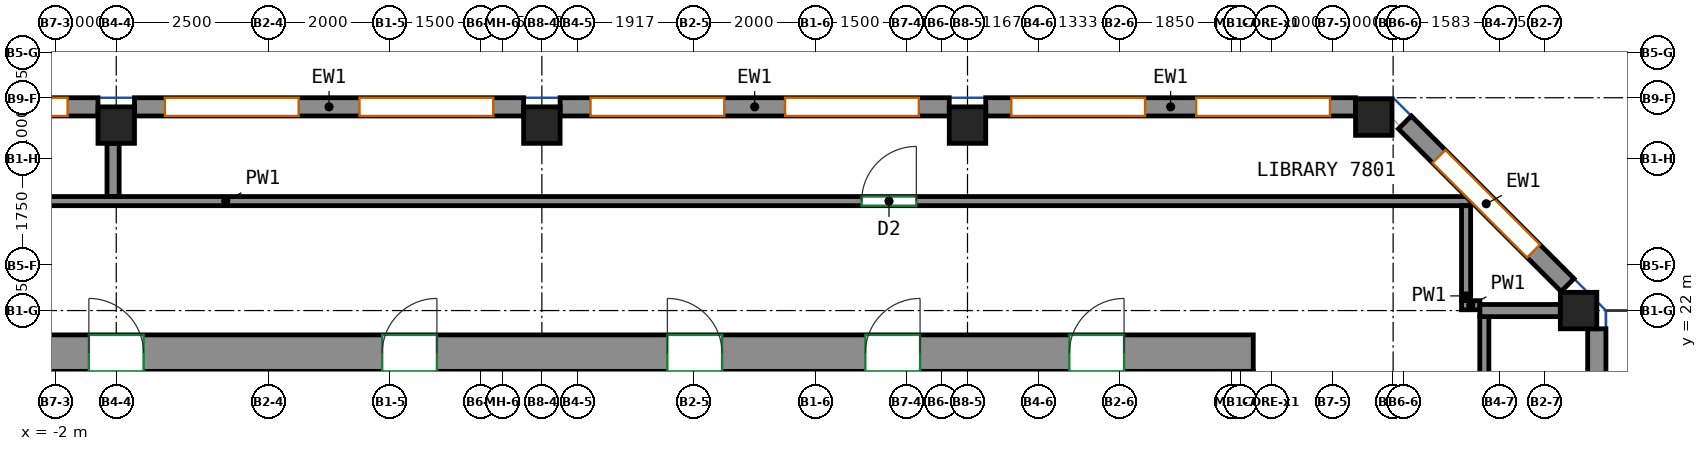
"""IFC4 building model, lengths in metres.
Left out: names, types, materials, properties, quantities, classifications, styles, units other than length and angle.
Written with IfcOpenShell. Run it as: python <this file> out.ifc"""

import sys

from ifc_helpers import new_model, si_unit, direction, frame, frame_2d, origin, origin_2d, place, context, subcontext, project, spatial, rectangle, extrude, source, transform, mapped, element, fill, save


model = new_model("IFC4")
c1 = context("Model", 3, precision=1e-05, world=origin(), true_north=direction((0.0, 1.0)))
c2 = subcontext(c1, "Body", "Model", "MODEL_VIEW")
j1 = project(units=[si_unit("LENGTHUNIT", "METRE"), si_unit("PLANEANGLEUNIT", "RADIAN")], contexts=[c1])
p1 = place(None, origin())
s1 = spatial("IfcSite", under=j1, at=p1, CompositionType="ELEMENT")
p2 = place(p1, origin())
s2 = spatial("IfcBuilding", under=s1, at=p2, CompositionType="ELEMENT")
p3 = place(p2, frame((0.0, 0.0, 312.0)))
s3 = spatial("IfcBuildingStorey", under=s2, at=p3, CompositionType="ELEMENT", Elevation=312.0)
m1 = source(origin(), c2, "Body", "SweptSolid", [
    extrude(rectangle(XDim=0.6, YDim=0.6, at=origin_2d()), origin(), (0.0, 0.0, 1.0), 3.12),
])
for number, where, z_axis, x_axis in (
    (1, (-1.0, 25.05, 0.0), (0.0, 0.0, 1.0), (1.0, 0.0, 0.0)),
    (2, (6.0, 25.05, 0.0), (0.0, 0.0, 1.0), (1.0, 0.0, 0.0)),
    (3, (13.0, 25.05, 0.0), (0.0, 0.0, 1.0), (1.0, 0.0, 0.0)),
    (4, (19.682, 25.182, 0.0), (0.0, 0.0, 1.0), (1.0, 0.0, 0.0)),
    (5, (23.05, 22.0, 0.0), (0.0, 0.0, 1.0), (1.0, 0.0, 0.0)),
):
    element("IfcColumn", number, at=place(p3, frame(where, z_axis=z_axis, x_axis=x_axis)), inside=s3, PredefinedType="COLUMN", context=c2, shape_type="MappedRepresentation", body=[
        mapped(m1, transform((0.0, 0.0, 0.0))),
    ])
m2 = source(origin(), c2, "Body", "SweptSolid", [
    extrude(rectangle(XDim=33.3, YDim=0.6, at=frame_2d((16.65, 0.0))), origin(), (0.0, 0.0, 1.0), 3.12),
])
p4 = place(p3, frame((-15.6, 21.3, 0.0), z_axis=(0.0, 0.0, 1.0), x_axis=(1.0, 0.0, 0.0)))
e6 = element("IfcWall", 6, at=p4, inside=s3, PredefinedType="SHEAR", context=c2, shape_type="MappedRepresentation", body=[
    mapped(m2, transform((0.0, 0.0, 0.0))),
])
p5 = place(p4, frame((8.12, 0.0, 0.0)))
e7 = element("IfcOpeningElement", 7, at=p5, cuts=e6, PredefinedType="OPENING", context=c2, shape_type="SweptSolid", body=[
    extrude(rectangle(XDim=0.9, YDim=2.1, at=frame_2d((0.45, 1.05))), frame((0.0, 0.31, 0.0), z_axis=(0.0, -1.0, 0.0), x_axis=(1.0, 0.0, 0.0)), (0.0, 0.0, 1.0), 0.62),
])
p6 = place(p4, frame((14.15, 0.0, 0.0)))
e8 = element("IfcOpeningElement", 8, at=p6, cuts=e6, PredefinedType="OPENING", context=c2, shape_type="SweptSolid", body=[
    extrude(rectangle(XDim=0.9, YDim=2.1, at=frame_2d((0.45, 1.05))), frame((0.0, 0.31, 0.0), z_axis=(0.0, -1.0, 0.0), x_axis=(1.0, 0.0, 0.0)), (0.0, 0.0, 1.0), 0.62),
])
p7 = place(p4, frame((18.974, 0.0, 0.0)))
e9 = element("IfcOpeningElement", 9, at=p7, cuts=e6, PredefinedType="OPENING", context=c2, shape_type="SweptSolid", body=[
    extrude(rectangle(XDim=0.9, YDim=2.1, at=frame_2d((0.45, 1.05))), frame((0.0, 0.31, 0.0), z_axis=(0.0, -1.0, 0.0), x_axis=(1.0, 0.0, 0.0)), (0.0, 0.0, 1.0), 0.62),
])
p8 = place(p4, frame((23.664, 0.0, 0.0)))
e10 = element("IfcOpeningElement", 10, at=p8, cuts=e6, PredefinedType="OPENING", context=c2, shape_type="SweptSolid", body=[
    extrude(rectangle(XDim=0.9, YDim=2.1, at=frame_2d((0.45, 1.05))), frame((0.0, 0.31, 0.0), z_axis=(0.0, -1.0, 0.0), x_axis=(1.0, 0.0, 0.0)), (0.0, 0.0, 1.0), 0.62),
])
p9 = place(p4, frame((26.92, 0.0, 0.0)))
e11 = element("IfcOpeningElement", 11, at=p9, cuts=e6, PredefinedType="OPENING", context=c2, shape_type="SweptSolid", body=[
    extrude(rectangle(XDim=0.9, YDim=2.1, at=frame_2d((0.45, 1.05))), frame((0.0, 0.31, 0.0), z_axis=(0.0, -1.0, 0.0), x_axis=(1.0, 0.0, 0.0)), (0.0, 0.0, 1.0), 0.62),
])
p10 = place(p4, frame((2.125, 0.0, 0.0)))
e12 = element("IfcOpeningElement", 12, at=p10, cuts=e6, PredefinedType="OPENING", context=c2, shape_type="SweptSolid", body=[
    extrude(rectangle(XDim=0.9, YDim=2.1, at=frame_2d((0.45, 1.05))), frame((0.0, 0.31, 0.0), z_axis=(0.0, -1.0, 0.0), x_axis=(1.0, 0.0, 0.0)), (0.0, 0.0, 1.0), 0.62),
])
p11 = place(p4, frame((30.275, 0.0, 0.0)))
e13 = element("IfcOpeningElement", 13, at=p11, cuts=e6, PredefinedType="OPENING", context=c2, shape_type="SweptSolid", body=[
    extrude(rectangle(XDim=0.9, YDim=2.1, at=frame_2d((0.45, 1.05))), frame((0.0, 0.31, 0.0), z_axis=(0.0, -1.0, 0.0), x_axis=(1.0, 0.0, 0.0)), (0.0, 0.0, 1.0), 0.62),
])
m3 = source(origin(), c2, "Body", "SweptSolid", [
    extrude(rectangle(XDim=13.4, YDim=0.3, at=frame_2d((6.7, 0.0))), origin(), (0.0, 0.0, 1.0), 3.12),
])
p12 = place(p3, frame((23.35, 8.3, 0.0), z_axis=(0.0, 0.0, 1.0), x_axis=(0.0, 1.0, 0.0)))
e14 = element("IfcWall", 14, at=p12, inside=s3, PredefinedType="SOLIDWALL", context=c2, shape_type="MappedRepresentation", body=[
    mapped(m3, transform((0.0, 0.0, 0.0))),
])
p13 = place(p12, frame((0.85, 0.0, 0.8)))
e15 = element("IfcOpeningElement", 15, at=p13, cuts=e14, PredefinedType="OPENING", context=c2, shape_type="SweptSolid", body=[
    extrude(rectangle(XDim=1.5, YDim=2.05, at=frame_2d((0.75, 1.025))), frame((0.0, 0.16, 0.0), z_axis=(0.0, -1.0, 0.0), x_axis=(1.0, 0.0, 0.0)), (0.0, 0.0, 1.0), 0.32),
])
p14 = place(p12, frame((4.95, 0.0, 0.8)))
e16 = element("IfcOpeningElement", 16, at=p14, cuts=e14, PredefinedType="OPENING", context=c2, shape_type="SweptSolid", body=[
    extrude(rectangle(XDim=1.5, YDim=2.05, at=frame_2d((0.75, 1.025))), frame((0.0, 0.16, 0.0), z_axis=(0.0, -1.0, 0.0), x_axis=(1.0, 0.0, 0.0)), (0.0, 0.0, 1.0), 0.32),
])
p15 = place(p12, frame((8.45, 0.0, 0.8)))
e17 = element("IfcOpeningElement", 17, at=p15, cuts=e14, PredefinedType="OPENING", context=c2, shape_type="SweptSolid", body=[
    extrude(rectangle(XDim=1.5, YDim=2.05, at=frame_2d((0.75, 1.025))), frame((0.0, 0.16, 0.0), z_axis=(0.0, -1.0, 0.0), x_axis=(1.0, 0.0, 0.0)), (0.0, 0.0, 1.0), 0.32),
])
p16 = place(p12, frame((11.05, 0.0, 0.8)))
e18 = element("IfcOpeningElement", 18, at=p16, cuts=e14, PredefinedType="OPENING", context=c2, shape_type="SweptSolid", body=[
    extrude(rectangle(XDim=1.5, YDim=2.05, at=frame_2d((0.75, 1.025))), frame((0.0, 0.16, 0.0), z_axis=(0.0, -1.0, 0.0), x_axis=(1.0, 0.0, 0.0)), (0.0, 0.0, 1.0), 0.32),
])
m4 = source(origin(), c2, "Body", "SweptSolid", [
    extrude(rectangle(XDim=3.783, YDim=0.3, at=frame_2d((1.892, 0.0))), origin(), (0.0, 0.0, 1.0), 3.12),
])
p17 = place(p3, frame((22.869, 22.419, 0.0), z_axis=(0.0, 0.0, 1.0), x_axis=(-0.707106781187, 0.707106781187, 0.0)))
e19 = element("IfcWall", 19, at=p17, inside=s3, PredefinedType="SOLIDWALL", context=c2, shape_type="MappedRepresentation", body=[
    mapped(m4, transform((0.0, 0.0, 0.0))),
])
p18 = place(p17, frame((0.792, 0.0, 0.8)))
e20 = element("IfcOpeningElement", 20, at=p18, cuts=e19, PredefinedType="OPENING", context=c2, shape_type="SweptSolid", body=[
    extrude(rectangle(XDim=2.2, YDim=2.05, at=frame_2d((1.1, 1.025))), frame((0.0, 0.16, 0.0), z_axis=(0.0, -1.0, 0.0), x_axis=(1.0, 0.0, 0.0)), (0.0, 0.0, 1.0), 0.32),
])
m5 = source(origin(), c2, "Body", "SweptSolid", [
    extrude(rectangle(XDim=6.082, YDim=0.3, at=frame_2d((3.041, 0.0))), origin(), (0.0, 0.0, 1.0), 3.12),
])
p19 = place(p3, frame((19.382, 25.35, 0.0), z_axis=(0.0, 0.0, 1.0), x_axis=(-1.0, 0.0, 0.0)))
e21 = element("IfcWall", 21, at=p19, inside=s3, PredefinedType="SOLIDWALL", context=c2, shape_type="MappedRepresentation", body=[
    mapped(m5, transform((0.0, 0.0, 0.0))),
])
p20 = place(p19, frame((0.42, 0.0, 0.8)))
e22 = element("IfcOpeningElement", 22, at=p20, cuts=e21, PredefinedType="OPENING", context=c2, shape_type="SweptSolid", body=[
    extrude(rectangle(XDim=2.2, YDim=2.05, at=frame_2d((1.1, 1.025))), frame((0.0, 0.16, 0.0), z_axis=(0.0, -1.0, 0.0), x_axis=(1.0, 0.0, 0.0)), (0.0, 0.0, 1.0), 0.32),
])
p21 = place(p19, frame((3.461, 0.0, 0.8)))
e23 = element("IfcOpeningElement", 23, at=p21, cuts=e21, PredefinedType="OPENING", context=c2, shape_type="SweptSolid", body=[
    extrude(rectangle(XDim=2.2, YDim=2.05, at=frame_2d((1.1, 1.025))), frame((0.0, 0.16, 0.0), z_axis=(0.0, -1.0, 0.0), x_axis=(1.0, 0.0, 0.0)), (0.0, 0.0, 1.0), 0.32),
])
m6 = source(origin(), c2, "Body", "SweptSolid", [
    extrude(rectangle(XDim=6.4, YDim=0.3, at=frame_2d((3.2, 0.0))), origin(), (0.0, 0.0, 1.0), 3.12),
])
p22 = place(p3, frame((12.7, 25.35, 0.0), z_axis=(0.0, 0.0, 1.0), x_axis=(-1.0, 0.0, 0.0)))
e24 = element("IfcWall", 24, at=p22, inside=s3, PredefinedType="SOLIDWALL", context=c2, shape_type="MappedRepresentation", body=[
    mapped(m6, transform((0.0, 0.0, 0.0))),
])
p23 = place(p22, frame((0.5, 0.0, 0.8)))
e25 = element("IfcOpeningElement", 25, at=p23, cuts=e24, PredefinedType="OPENING", context=c2, shape_type="SweptSolid", body=[
    extrude(rectangle(XDim=2.2, YDim=2.05, at=frame_2d((1.1, 1.025))), frame((0.0, 0.16, 0.0), z_axis=(0.0, -1.0, 0.0), x_axis=(1.0, 0.0, 0.0)), (0.0, 0.0, 1.0), 0.32),
])
p24 = place(p22, frame((3.7, 0.0, 0.8)))
e26 = element("IfcOpeningElement", 26, at=p24, cuts=e24, PredefinedType="OPENING", context=c2, shape_type="SweptSolid", body=[
    extrude(rectangle(XDim=2.2, YDim=2.05, at=frame_2d((1.1, 1.025))), frame((0.0, 0.16, 0.0), z_axis=(0.0, -1.0, 0.0), x_axis=(1.0, 0.0, 0.0)), (0.0, 0.0, 1.0), 0.32),
])
p25 = place(p3, frame((5.7, 25.35, 0.0), z_axis=(0.0, 0.0, 1.0), x_axis=(-1.0, 0.0, 0.0)))
e27 = element("IfcWall", 27, at=p25, inside=s3, PredefinedType="SOLIDWALL", context=c2, shape_type="MappedRepresentation", body=[
    mapped(m6, transform((0.0, 0.0, 0.0))),
])
p26 = place(p25, frame((0.5, 0.0, 0.8)))
e28 = element("IfcOpeningElement", 28, at=p26, cuts=e27, PredefinedType="OPENING", context=c2, shape_type="SweptSolid", body=[
    extrude(rectangle(XDim=2.2, YDim=2.05, at=frame_2d((1.1, 1.025))), frame((0.0, 0.16, 0.0), z_axis=(0.0, -1.0, 0.0), x_axis=(1.0, 0.0, 0.0)), (0.0, 0.0, 1.0), 0.32),
])
p27 = place(p25, frame((3.7, 0.0, 0.8)))
e29 = element("IfcOpeningElement", 29, at=p27, cuts=e27, PredefinedType="OPENING", context=c2, shape_type="SweptSolid", body=[
    extrude(rectangle(XDim=2.2, YDim=2.05, at=frame_2d((1.1, 1.025))), frame((0.0, 0.16, 0.0), z_axis=(0.0, -1.0, 0.0), x_axis=(1.0, 0.0, 0.0)), (0.0, 0.0, 1.0), 0.32),
])
p28 = place(p3, frame((-1.3, 25.35, 0.0), z_axis=(0.0, 0.0, 1.0), x_axis=(-1.0, 0.0, 0.0)))
e30 = element("IfcWall", 30, at=p28, inside=s3, PredefinedType="SOLIDWALL", context=c2, shape_type="MappedRepresentation", body=[
    mapped(m6, transform((0.0, 0.0, 0.0))),
])
p29 = place(p28, frame((0.5, 0.0, 0.8)))
e31 = element("IfcOpeningElement", 31, at=p29, cuts=e30, PredefinedType="OPENING", context=c2, shape_type="SweptSolid", body=[
    extrude(rectangle(XDim=2.2, YDim=2.05, at=frame_2d((1.1, 1.025))), frame((0.0, 0.16, 0.0), z_axis=(0.0, -1.0, 0.0), x_axis=(1.0, 0.0, 0.0)), (0.0, 0.0, 1.0), 0.32),
])
p30 = place(p28, frame((3.7, 0.0, 0.8)))
e32 = element("IfcOpeningElement", 32, at=p30, cuts=e30, PredefinedType="OPENING", context=c2, shape_type="SweptSolid", body=[
    extrude(rectangle(XDim=2.2, YDim=2.05, at=frame_2d((1.1, 1.025))), frame((0.0, 0.16, 0.0), z_axis=(0.0, -1.0, 0.0), x_axis=(1.0, 0.0, 0.0)), (0.0, 0.0, 1.0), 0.32),
])
p31 = place(p3, frame((21.5, -7.75, 0.0), z_axis=(0.0, 0.0, 1.0), x_axis=(0.0, 1.0, 0.0)))
e33 = element("IfcWall", 33, at=p31, inside=s3, PredefinedType="PARTITIONING", context=c2, shape_type="SweptSolid", body=[
    extrude(rectangle(XDim=29.66, YDim=0.15, at=frame_2d((14.83, 0.0))), origin(), (0.0, 0.0, 1.0), 3.12),
])
p32 = place(p31, frame((20.142, 0.0, 0.0)))
e34 = element("IfcOpeningElement", 34, at=p32, cuts=e33, PredefinedType="OPENING", context=c2, shape_type="SweptSolid", body=[
    extrude(rectangle(XDim=0.9, YDim=2.1, at=frame_2d((0.45, 1.05))), frame((0.0, 0.085, 0.0), z_axis=(0.0, -1.0, 0.0), x_axis=(1.0, 0.0, 0.0)), (0.0, 0.0, 1.0), 0.17),
])
p33 = place(p3, frame((-19.675, 23.8, 0.0), z_axis=(0.0, 0.0, 1.0), x_axis=(1.0, 0.0, 0.0)))
e35 = element("IfcWall", 35, at=p33, inside=s3, PredefinedType="PARTITIONING", context=c2, shape_type="SweptSolid", body=[
    extrude(rectangle(XDim=40.95, YDim=0.15, at=frame_2d((20.475, 0.0))), origin(), (0.0, 0.0, 1.0), 3.12),
])
p34 = place(p33, frame((8.716, 0.0, 0.0)))
e36 = element("IfcOpeningElement", 36, at=p34, cuts=e35, PredefinedType="OPENING", context=c2, shape_type="SweptSolid", body=[
    extrude(rectangle(XDim=0.9, YDim=2.1, at=frame_2d((0.45, 1.05))), frame((0.0, 0.085, 0.0), z_axis=(0.0, -1.0, 0.0), x_axis=(1.0, 0.0, 0.0)), (0.0, 0.0, 1.0), 0.17),
])
p35 = place(p33, frame((30.934, 0.0, 0.0)))
e37 = element("IfcOpeningElement", 37, at=p35, cuts=e35, PredefinedType="OPENING", context=c2, shape_type="SweptSolid", body=[
    extrude(rectangle(XDim=0.9, YDim=2.1, at=frame_2d((0.45, 1.05))), frame((0.0, 0.085, 0.0), z_axis=(0.0, -1.0, 0.0), x_axis=(1.0, 0.0, 0.0)), (0.0, 0.0, 1.0), 0.17),
])
p36 = place(p3, frame((21.2, 22.163, 0.0), z_axis=(0.0, 0.0, 1.0), x_axis=(0.0, 1.0, 0.0)))
e38 = element("IfcWall", 38, at=p36, inside=s3, PredefinedType="PARTITIONING", context=c2, shape_type="SweptSolid", body=[
    extrude(rectangle(XDim=1.562, YDim=0.15, at=frame_2d((0.781, 0.0))), origin(), (0.0, 0.0, 1.0), 3.12),
])
p37 = place(p3, frame((21.427, 22.088, 0.0), z_axis=(0.0, 0.0, 1.0), x_axis=(-1.0, 0.0, 0.0)))
e39 = element("IfcWall", 39, at=p37, inside=s3, PredefinedType="PARTITIONING", context=c2, shape_type="SweptSolid", body=[
    extrude(rectangle(XDim=0.302, YDim=0.15, at=frame_2d((0.151, 0.0))), origin(), (0.0, 0.0, 1.0), 3.12),
])
p38 = place(p3, frame((22.75, 22.0, 0.0), z_axis=(0.0, 0.0, 1.0), x_axis=(-1.0, 0.0, 0.0)))
e40 = element("IfcWall", 40, at=p38, inside=s3, PredefinedType="PARTITIONING", context=c2, shape_type="SweptSolid", body=[
    extrude(rectangle(XDim=1.323, YDim=0.2, at=frame_2d((0.662, 0.0))), origin(), (0.0, 0.0, 1.0), 3.12),
])
p39 = place(p3, frame((-1.052, 23.877, 0.0), z_axis=(0.0, 0.0, 1.0), x_axis=(0.0, 1.0, 0.0)))
e41 = element("IfcWall", 41, at=p39, inside=s3, PredefinedType="PARTITIONING", context=c2, shape_type="SweptSolid", body=[
    extrude(rectangle(XDim=0.873, YDim=0.2, at=frame_2d((0.437, 0.0))), origin(), (0.0, 0.0, 1.0), 3.12),
])
p40 = place(p18, origin())
e42 = element("IfcWindow", 42, at=p40, inside=s3, PartitioningType="SINGLE_PANEL", PredefinedType="WINDOW", context=c2, shape_type="SweptSolid", body=[
    extrude(rectangle(XDim=2.2, YDim=2.05, at=frame_2d((1.1, 1.025))), frame((0.0, 0.03, 0.0), z_axis=(0.0, -1.0, 0.0), x_axis=(1.0, 0.0, 0.0)), (0.0, 0.0, 1.0), 0.06),
])
fill(e20, e42)
p41 = place(p20, origin())
e43 = element("IfcWindow", 43, at=p41, inside=s3, PartitioningType="SINGLE_PANEL", PredefinedType="WINDOW", context=c2, shape_type="SweptSolid", body=[
    extrude(rectangle(XDim=2.2, YDim=2.05, at=frame_2d((1.1, 1.025))), frame((0.0, 0.03, 0.0), z_axis=(0.0, -1.0, 0.0), x_axis=(1.0, 0.0, 0.0)), (0.0, 0.0, 1.0), 0.06),
])
fill(e22, e43)
p42 = place(p21, origin())
e44 = element("IfcWindow", 44, at=p42, inside=s3, PartitioningType="SINGLE_PANEL", PredefinedType="WINDOW", context=c2, shape_type="SweptSolid", body=[
    extrude(rectangle(XDim=2.2, YDim=2.05, at=frame_2d((1.1, 1.025))), frame((0.0, 0.03, 0.0), z_axis=(0.0, -1.0, 0.0), x_axis=(1.0, 0.0, 0.0)), (0.0, 0.0, 1.0), 0.06),
])
fill(e23, e44)
p43 = place(p23, origin())
e45 = element("IfcWindow", 45, at=p43, inside=s3, PartitioningType="SINGLE_PANEL", PredefinedType="WINDOW", context=c2, shape_type="SweptSolid", body=[
    extrude(rectangle(XDim=2.2, YDim=2.05, at=frame_2d((1.1, 1.025))), frame((0.0, 0.03, 0.0), z_axis=(0.0, -1.0, 0.0), x_axis=(1.0, 0.0, 0.0)), (0.0, 0.0, 1.0), 0.06),
])
fill(e25, e45)
p44 = place(p24, origin())
e46 = element("IfcWindow", 46, at=p44, inside=s3, PartitioningType="SINGLE_PANEL", PredefinedType="WINDOW", context=c2, shape_type="SweptSolid", body=[
    extrude(rectangle(XDim=2.2, YDim=2.05, at=frame_2d((1.1, 1.025))), frame((0.0, 0.03, 0.0), z_axis=(0.0, -1.0, 0.0), x_axis=(1.0, 0.0, 0.0)), (0.0, 0.0, 1.0), 0.06),
])
fill(e26, e46)
p45 = place(p26, origin())
e47 = element("IfcWindow", 47, at=p45, inside=s3, PartitioningType="SINGLE_PANEL", PredefinedType="WINDOW", context=c2, shape_type="SweptSolid", body=[
    extrude(rectangle(XDim=2.2, YDim=2.05, at=frame_2d((1.1, 1.025))), frame((0.0, 0.03, 0.0), z_axis=(0.0, -1.0, 0.0), x_axis=(1.0, 0.0, 0.0)), (0.0, 0.0, 1.0), 0.06),
])
fill(e28, e47)
p46 = place(p27, origin())
e48 = element("IfcWindow", 48, at=p46, inside=s3, PartitioningType="SINGLE_PANEL", PredefinedType="WINDOW", context=c2, shape_type="SweptSolid", body=[
    extrude(rectangle(XDim=2.2, YDim=2.05, at=frame_2d((1.1, 1.025))), frame((0.0, 0.03, 0.0), z_axis=(0.0, -1.0, 0.0), x_axis=(1.0, 0.0, 0.0)), (0.0, 0.0, 1.0), 0.06),
])
fill(e29, e48)
p47 = place(p29, origin())
e49 = element("IfcWindow", 49, at=p47, inside=s3, PartitioningType="SINGLE_PANEL", PredefinedType="WINDOW", context=c2, shape_type="SweptSolid", body=[
    extrude(rectangle(XDim=2.2, YDim=2.05, at=frame_2d((1.1, 1.025))), frame((0.0, 0.03, 0.0), z_axis=(0.0, -1.0, 0.0), x_axis=(1.0, 0.0, 0.0)), (0.0, 0.0, 1.0), 0.06),
])
fill(e31, e49)
p48 = place(p6, origin())
e50 = element("IfcDoor", 50, at=p48, inside=s3, OperationType="SINGLE_SWING_LEFT", PredefinedType="DOOR", context=c2, shape_type="SweptSolid", body=[
    extrude(rectangle(XDim=0.9, YDim=2.1, at=frame_2d((0.45, 1.05))), frame((0.0, -0.155, 0.0), z_axis=(0.0, -1.0, 0.0), x_axis=(1.0, 0.0, 0.0)), (0.0, 0.0, 1.0), 0.05),
])
fill(e8, e50)
p49 = place(p7, origin())
e51 = element("IfcDoor", 51, at=p49, inside=s3, OperationType="SINGLE_SWING_RIGHT", PredefinedType="DOOR", context=c2, shape_type="SweptSolid", body=[
    extrude(rectangle(XDim=0.9, YDim=2.1, at=frame_2d((0.45, 1.05))), frame((0.0, -0.155, 0.0), z_axis=(0.0, -1.0, 0.0), x_axis=(1.0, 0.0, 0.0)), (0.0, 0.0, 1.0), 0.05),
])
fill(e9, e51)
p50 = place(p8, origin())
e52 = element("IfcDoor", 52, at=p50, inside=s3, OperationType="SINGLE_SWING_LEFT", PredefinedType="DOOR", context=c2, shape_type="SweptSolid", body=[
    extrude(rectangle(XDim=0.9, YDim=2.1, at=frame_2d((0.45, 1.05))), frame((0.0, -0.155, 0.0), z_axis=(0.0, -1.0, 0.0), x_axis=(1.0, 0.0, 0.0)), (0.0, 0.0, 1.0), 0.05),
])
fill(e10, e52)
p51 = place(p9, origin())
e53 = element("IfcDoor", 53, at=p51, inside=s3, OperationType="SINGLE_SWING_RIGHT", PredefinedType="DOOR", context=c2, shape_type="SweptSolid", body=[
    extrude(rectangle(XDim=0.9, YDim=2.1, at=frame_2d((0.45, 1.05))), frame((0.0, -0.155, 0.0), z_axis=(0.0, -1.0, 0.0), x_axis=(1.0, 0.0, 0.0)), (0.0, 0.0, 1.0), 0.05),
])
fill(e11, e53)
p52 = place(p11, origin())
e54 = element("IfcDoor", 54, at=p52, inside=s3, OperationType="SINGLE_SWING_RIGHT", PredefinedType="DOOR", context=c2, shape_type="SweptSolid", body=[
    extrude(rectangle(XDim=0.9, YDim=2.1, at=frame_2d((0.45, 1.05))), frame((0.0, -0.155, 0.0), z_axis=(0.0, -1.0, 0.0), x_axis=(1.0, 0.0, 0.0)), (0.0, 0.0, 1.0), 0.05),
])
fill(e13, e54)
p53 = place(p35, origin())
e55 = element("IfcDoor", 55, at=p53, inside=s3, OperationType="SINGLE_SWING_RIGHT", PredefinedType="DOOR", context=c2, shape_type="SweptSolid", body=[
    extrude(rectangle(XDim=0.9, YDim=2.1, at=frame_2d((0.45, 1.05))), frame((0.0, 0.025, 0.0), z_axis=(0.0, -1.0, 0.0), x_axis=(1.0, 0.0, 0.0)), (0.0, 0.0, 1.0), 0.05),
])
fill(e37, e55)
save(model, sys.argv[1])
